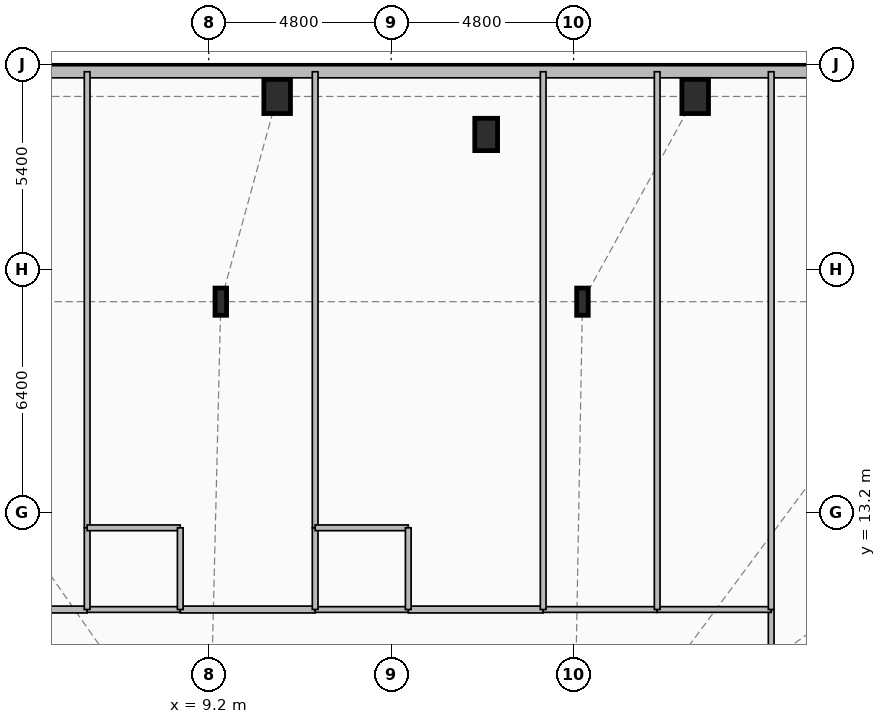
"""IFC4 building model, lengths in metres.
Left out: names, types, materials, properties, quantities, classifications, styles, units other than length and angle.
Written with IfcOpenShell. Run it as: python <this file> out.ifc"""

import sys

from ifc_helpers import new_model, si_unit, direction, frame, frame_2d, origin, origin_2d, place, context, subcontext, project, spatial, rectangle, i_section, extrude, element, fill, save


model = new_model("IFC4")
c1 = context("Model", 3, precision=1e-05, world=origin(), true_north=direction((0.0, 1.0)))
c2 = subcontext(c1, "Body", "Model", "MODEL_VIEW")
j1 = project(units=[si_unit("LENGTHUNIT", "METRE"), si_unit("PLANEANGLEUNIT", "RADIAN")], contexts=[c1])
p1 = place(None, origin())
s1 = spatial("IfcSite", under=j1, at=p1, CompositionType="ELEMENT")
p2 = place(p1, origin())
s2 = spatial("IfcBuilding", under=s1, at=p2, CompositionType="ELEMENT")
p3 = place(p2, frame((0.0, 0.0, 22.5)))
s3 = spatial("IfcBuildingStorey", under=s2, at=p3, CompositionType="ELEMENT", Elevation=22.5)
for number, where, z_axis, x_axis in (
    (1, (11.0, 24.15, 0.0), (0.0, 0.0, 1.0), (1.0, 0.0, 0.0)),
    (2, (22.0, 24.15, 0.0), (0.0, 0.0, 1.0), (1.0, 0.0, 0.0)),
):
    element("IfcColumn", number, at=place(p3, frame(where, z_axis=z_axis, x_axis=x_axis)), inside=s3, PredefinedType="COLUMN", context=c2, shape_type="SweptSolid", body=[
        extrude(rectangle(XDim=0.7, YDim=0.9, at=origin_2d()), origin(), (0.0, 0.0, 1.0), 4.5),
    ])
p4 = place(p3, frame((16.5, 23.15, 0.0), z_axis=(0.0, 0.0, 1.0), x_axis=(1.0, 0.0, 0.0)))
e3 = element("IfcColumn", 3, at=p4, inside=s3, PredefinedType="PILASTER", context=c2, shape_type="SweptSolid", body=[
    extrude(rectangle(XDim=0.6, YDim=0.85, at=origin_2d()), origin(), (0.0, 0.0, 1.0), 4.5),
])
for number, where, z_axis, x_axis in (
    (4, (19.033, 18.75, 0.0), (0.0, 0.0, 1.0), (1.0, 0.0, 0.0)),
    (5, (9.517, 18.75, 0.0), (0.0, 0.0, 1.0), (1.0, 0.0, 0.0)),
):
    element("IfcColumn", number, at=place(p3, frame(where, z_axis=z_axis, x_axis=x_axis)), inside=s3, PredefinedType="COLUMN", context=c2, shape_type="SweptSolid", body=[
        extrude(i_section(OverallWidth=0.304, OverallDepth=0.716, WebThickness=0.021, FlangeThickness=0.04, FilletRadius=0.027, at=origin_2d()), origin(), (0.0, 0.0, 1.0), 4.5),
    ])
p5 = place(p3, frame((-36.8, 24.8, 0.0), z_axis=(0.0, 0.0, 1.0), x_axis=(1.0, 0.0, 0.0)))
e6 = element("IfcWall", 6, at=p5, inside=s3, PredefinedType="SOLIDWALL", context=c2, shape_type="SweptSolid", body=[
    extrude(rectangle(XDim=73.6, YDim=0.32, at=frame_2d((36.8, 0.0))), origin(), (0.0, 0.0, 1.0), 4.16),
])
p6 = place(p5, frame((1.079, 0.0, 0.85)))
e7 = element("IfcOpeningElement", 7, at=p6, cuts=e6, PredefinedType="OPENING", context=c2, shape_type="SweptSolid", body=[
    extrude(rectangle(XDim=2.3, YDim=2.4, at=frame_2d((1.15, 1.2))), frame((0.0, 0.17, 0.0), z_axis=(0.0, -1.0, 0.0), x_axis=(1.0, 0.0, 0.0)), (0.0, 0.0, 1.0), 0.34),
])
p7 = place(p5, frame((8.431, 0.0, 0.85)))
e8 = element("IfcOpeningElement", 8, at=p7, cuts=e6, PredefinedType="OPENING", context=c2, shape_type="SweptSolid", body=[
    extrude(rectangle(XDim=2.6, YDim=2.4, at=frame_2d((1.3, 1.2))), frame((0.0, 0.17, 0.0), z_axis=(0.0, -1.0, 0.0), x_axis=(1.0, 0.0, 0.0)), (0.0, 0.0, 1.0), 0.34),
])
p8 = place(p5, frame((13.316, 0.0, 0.85)))
e9 = element("IfcOpeningElement", 9, at=p8, cuts=e6, PredefinedType="OPENING", context=c2, shape_type="SweptSolid", body=[
    extrude(rectangle(XDim=1.1, YDim=1.85, at=frame_2d((0.55, 0.925))), frame((0.0, 0.17, 0.0), z_axis=(0.0, -1.0, 0.0), x_axis=(1.0, 0.0, 0.0)), (0.0, 0.0, 1.0), 0.34),
])
p9 = place(p5, frame((16.339, 0.0, 0.85)))
e10 = element("IfcOpeningElement", 10, at=p9, cuts=e6, PredefinedType="OPENING", context=c2, shape_type="SweptSolid", body=[
    extrude(rectangle(XDim=2.0, YDim=2.4, at=frame_2d((1.0, 1.2))), frame((0.0, 0.17, 0.0), z_axis=(0.0, -1.0, 0.0), x_axis=(1.0, 0.0, 0.0)), (0.0, 0.0, 1.0), 0.34),
])
p10 = place(p5, frame((21.875, 0.0, 0.85)))
e11 = element("IfcOpeningElement", 11, at=p10, cuts=e6, PredefinedType="OPENING", context=c2, shape_type="SweptSolid", body=[
    extrude(rectangle(XDim=2.3, YDim=2.4, at=frame_2d((1.15, 1.2))), frame((0.0, 0.17, 0.0), z_axis=(0.0, -1.0, 0.0), x_axis=(1.0, 0.0, 0.0)), (0.0, 0.0, 1.0), 0.34),
])
p11 = place(p5, frame((26.53, 0.0, 0.85)))
e12 = element("IfcOpeningElement", 12, at=p11, cuts=e6, PredefinedType="OPENING", context=c2, shape_type="SweptSolid", body=[
    extrude(rectangle(XDim=2.6, YDim=2.4, at=frame_2d((1.3, 1.2))), frame((0.0, 0.17, 0.0), z_axis=(0.0, -1.0, 0.0), x_axis=(1.0, 0.0, 0.0)), (0.0, 0.0, 1.0), 0.34),
])
p12 = place(p5, frame((32.537, 0.0, 0.85)))
e13 = element("IfcOpeningElement", 13, at=p12, cuts=e6, PredefinedType="OPENING", context=c2, shape_type="SweptSolid", body=[
    extrude(rectangle(XDim=2.6, YDim=2.4, at=frame_2d((1.3, 1.2))), frame((0.0, 0.17, 0.0), z_axis=(0.0, -1.0, 0.0), x_axis=(1.0, 0.0, 0.0)), (0.0, 0.0, 1.0), 0.34),
])
p13 = place(p5, frame((38.543, 0.0, 0.85)))
e14 = element("IfcOpeningElement", 14, at=p13, cuts=e6, PredefinedType="OPENING", context=c2, shape_type="SweptSolid", body=[
    extrude(rectangle(XDim=2.6, YDim=2.4, at=frame_2d((1.3, 1.2))), frame((0.0, 0.17, 0.0), z_axis=(0.0, -1.0, 0.0), x_axis=(1.0, 0.0, 0.0)), (0.0, 0.0, 1.0), 0.34),
])
p14 = place(p5, frame((44.55, 0.0, 0.85)))
e15 = element("IfcOpeningElement", 15, at=p14, cuts=e6, PredefinedType="OPENING", context=c2, shape_type="SweptSolid", body=[
    extrude(rectangle(XDim=2.6, YDim=2.4, at=frame_2d((1.3, 1.2))), frame((0.0, 0.17, 0.0), z_axis=(0.0, -1.0, 0.0), x_axis=(1.0, 0.0, 0.0)), (0.0, 0.0, 1.0), 0.34),
])
p15 = place(p5, frame((50.556, 0.0, 0.85)))
e16 = element("IfcOpeningElement", 16, at=p15, cuts=e6, PredefinedType="OPENING", context=c2, shape_type="SweptSolid", body=[
    extrude(rectangle(XDim=2.6, YDim=2.4, at=frame_2d((1.3, 1.2))), frame((0.0, 0.17, 0.0), z_axis=(0.0, -1.0, 0.0), x_axis=(1.0, 0.0, 0.0)), (0.0, 0.0, 1.0), 0.34),
])
p16 = place(p5, frame((55.341, 0.0, 0.85)))
e17 = element("IfcOpeningElement", 17, at=p16, cuts=e6, PredefinedType="OPENING", context=c2, shape_type="SweptSolid", body=[
    extrude(rectangle(XDim=2.0, YDim=2.4, at=frame_2d((1.0, 1.2))), frame((0.0, 0.17, 0.0), z_axis=(0.0, -1.0, 0.0), x_axis=(1.0, 0.0, 0.0)), (0.0, 0.0, 1.0), 0.34),
])
p17 = place(p5, frame((59.16, 0.0, 0.85)))
e18 = element("IfcOpeningElement", 18, at=p17, cuts=e6, PredefinedType="OPENING", context=c2, shape_type="SweptSolid", body=[
    extrude(rectangle(XDim=1.1, YDim=1.85, at=frame_2d((0.55, 0.925))), frame((0.0, 0.17, 0.0), z_axis=(0.0, -1.0, 0.0), x_axis=(1.0, 0.0, 0.0)), (0.0, 0.0, 1.0), 0.34),
])
p18 = place(p5, frame((62.649, 0.0, 0.85)))
e19 = element("IfcOpeningElement", 19, at=p18, cuts=e6, PredefinedType="OPENING", context=c2, shape_type="SweptSolid", body=[
    extrude(rectangle(XDim=2.6, YDim=2.4, at=frame_2d((1.3, 1.2))), frame((0.0, 0.17, 0.0), z_axis=(0.0, -1.0, 0.0), x_axis=(1.0, 0.0, 0.0)), (0.0, 0.0, 1.0), 0.34),
])
p19 = place(p5, frame((70.301, 0.0, 0.85)))
e20 = element("IfcOpeningElement", 20, at=p19, cuts=e6, PredefinedType="OPENING", context=c2, shape_type="SweptSolid", body=[
    extrude(rectangle(XDim=2.3, YDim=2.4, at=frame_2d((1.15, 1.2))), frame((0.0, 0.17, 0.0), z_axis=(0.0, -1.0, 0.0), x_axis=(1.0, 0.0, 0.0)), (0.0, 0.0, 1.0), 0.34),
])
p20 = place(p3, frame((24.0, 10.65, 0.0), z_axis=(0.0, 0.0, 1.0), x_axis=(0.0, -1.0, 0.0)))
e21 = element("IfcWall", 21, at=p20, inside=s3, PredefinedType="PARTITIONING", context=c2, shape_type="SweptSolid", body=[
    extrude(rectangle(XDim=2.15, YDim=0.15, at=frame_2d((1.075, 0.0))), origin(), (0.0, 0.0, 1.0), 4.16),
])
p21 = place(p20, frame((0.625, 0.0, 0.0)))
e22 = element("IfcOpeningElement", 22, at=p21, cuts=e21, PredefinedType="OPENING", context=c2, shape_type="SweptSolid", body=[
    extrude(rectangle(XDim=0.9, YDim=2.1, at=frame_2d((0.45, 1.05))), frame((0.0, 0.085, 0.0), z_axis=(0.0, -1.0, 0.0), x_axis=(1.0, 0.0, 0.0)), (0.0, 0.0, 1.0), 0.17),
])
p22 = place(p3, frame((2.45, 10.65, 0.0), z_axis=(0.0, 0.0, 1.0), x_axis=(1.0, 0.0, 0.0)))
e23 = element("IfcWall", 23, at=p22, inside=s3, PredefinedType="PARTITIONING", context=c2, shape_type="SweptSolid", body=[
    extrude(rectangle(XDim=3.55, YDim=0.18, at=frame_2d((1.775, 0.0))), origin(), (0.0, 0.0, 1.0), 4.16),
])
p23 = place(p22, frame((0.754, 0.0, 0.0)))
e24 = element("IfcOpeningElement", 24, at=p23, cuts=e23, PredefinedType="OPENING", context=c2, shape_type="SweptSolid", body=[
    extrude(rectangle(XDim=1.0, YDim=2.15, at=frame_2d((0.5, 1.075))), frame((0.0, 0.1, 0.0), z_axis=(0.0, -1.0, 0.0), x_axis=(1.0, 0.0, 0.0)), (0.0, 0.0, 1.0), 0.2),
])
p24 = place(p3, frame((8.45, 10.65, 0.0), z_axis=(0.0, 0.0, 1.0), x_axis=(1.0, 0.0, 0.0)))
e25 = element("IfcWall", 25, at=p24, inside=s3, PredefinedType="PARTITIONING", context=c2, shape_type="SweptSolid", body=[
    extrude(rectangle(XDim=3.55, YDim=0.18, at=frame_2d((1.775, 0.0))), origin(), (0.0, 0.0, 1.0), 4.16),
])
p25 = place(p24, frame((1.796, 0.0, 0.0)))
e26 = element("IfcOpeningElement", 26, at=p25, cuts=e25, PredefinedType="OPENING", context=c2, shape_type="SweptSolid", body=[
    extrude(rectangle(XDim=1.0, YDim=2.15, at=frame_2d((0.5, 1.075))), frame((0.0, 0.1, 0.0), z_axis=(0.0, -1.0, 0.0), x_axis=(1.0, 0.0, 0.0)), (0.0, 0.0, 1.0), 0.2),
])
p26 = place(p3, frame((6.0, 10.65, 0.0), z_axis=(0.0, 0.0, 1.0), x_axis=(1.0, 0.0, 0.0)))
e27 = element("IfcWall", 27, at=p26, inside=s3, PredefinedType="PLUMBINGWALL", context=c2, shape_type="SweptSolid", body=[
    extrude(rectangle(XDim=2.45, YDim=0.15, at=frame_2d((1.225, 0.0))), origin(), (0.0, 0.0, 1.0), 4.16),
])
p27 = place(p3, frame((14.45, 10.65, 0.0), z_axis=(0.0, 0.0, 1.0), x_axis=(1.0, 0.0, 0.0)))
e28 = element("IfcWall", 28, at=p27, inside=s3, PredefinedType="PARTITIONING", context=c2, shape_type="SweptSolid", body=[
    extrude(rectangle(XDim=3.55, YDim=0.18, at=frame_2d((1.775, 0.0))), origin(), (0.0, 0.0, 1.0), 4.16),
])
p28 = place(p27, frame((0.754, 0.0, 0.0)))
e29 = element("IfcOpeningElement", 29, at=p28, cuts=e28, PredefinedType="OPENING", context=c2, shape_type="SweptSolid", body=[
    extrude(rectangle(XDim=1.0, YDim=2.15, at=frame_2d((0.5, 1.075))), frame((0.0, 0.1, 0.0), z_axis=(0.0, -1.0, 0.0), x_axis=(1.0, 0.0, 0.0)), (0.0, 0.0, 1.0), 0.2),
])
p29 = place(p3, frame((12.0, 10.65, 0.0), z_axis=(0.0, 0.0, 1.0), x_axis=(1.0, 0.0, 0.0)))
e30 = element("IfcWall", 30, at=p29, inside=s3, PredefinedType="PLUMBINGWALL", context=c2, shape_type="SweptSolid", body=[
    extrude(rectangle(XDim=2.45, YDim=0.15, at=frame_2d((1.225, 0.0))), origin(), (0.0, 0.0, 1.0), 4.16),
])
p30 = place(p3, frame((18.0, 10.65, 0.0), z_axis=(0.0, 0.0, 1.0), x_axis=(1.0, 0.0, 0.0)))
e31 = element("IfcWall", 31, at=p30, inside=s3, PredefinedType="PARTITIONING", context=c2, shape_type="SweptSolid", body=[
    extrude(rectangle(XDim=3.0, YDim=0.15, at=frame_2d((1.5, 0.0))), origin(), (0.0, 0.0, 1.0), 4.16),
])
p31 = place(p30, frame((1.271, 0.0, 0.0)))
e32 = element("IfcOpeningElement", 32, at=p31, cuts=e31, PredefinedType="OPENING", context=c2, shape_type="SweptSolid", body=[
    extrude(rectangle(XDim=1.05, YDim=2.15, at=frame_2d((0.525, 1.075))), frame((0.0, 0.085, 0.0), z_axis=(0.0, -1.0, 0.0), x_axis=(1.0, 0.0, 0.0)), (0.0, 0.0, 1.0), 0.17),
])
p32 = place(p3, frame((21.0, 10.65, 0.0), z_axis=(0.0, 0.0, 1.0), x_axis=(1.0, 0.0, 0.0)))
e33 = element("IfcWall", 33, at=p32, inside=s3, PredefinedType="PARTITIONING", context=c2, shape_type="SweptSolid", body=[
    extrude(rectangle(XDim=3.0, YDim=0.15, at=frame_2d((1.5, 0.0))), origin(), (0.0, 0.0, 1.0), 4.16),
])
p33 = place(p32, frame((1.271, 0.0, 0.0)))
e34 = element("IfcOpeningElement", 34, at=p33, cuts=e33, PredefinedType="OPENING", context=c2, shape_type="SweptSolid", body=[
    extrude(rectangle(XDim=1.05, YDim=2.15, at=frame_2d((0.525, 1.075))), frame((0.0, 0.085, 0.0), z_axis=(0.0, -1.0, 0.0), x_axis=(1.0, 0.0, 0.0)), (0.0, 0.0, 1.0), 0.17),
])
p34 = place(p3, frame((24.0, 10.65, 0.0), z_axis=(0.0, 0.0, 1.0), x_axis=(0.0, 1.0, 0.0)))
e35 = element("IfcWall", 35, at=p34, inside=s3, PredefinedType="PARTITIONING", context=c2, shape_type="SweptSolid", body=[
    extrude(rectangle(XDim=14.15, YDim=0.15, at=frame_2d((7.075, 0.0))), origin(), (0.0, 0.0, 1.0), 4.16),
])
p35 = place(p3, frame((6.0, 24.8, 0.0), z_axis=(0.0, 0.0, 1.0), x_axis=(0.0, -1.0, 0.0)))
e36 = element("IfcWall", 36, at=p35, inside=s3, PredefinedType="PARTITIONING", context=c2, shape_type="SweptSolid", body=[
    extrude(rectangle(XDim=12.0, YDim=0.15, at=frame_2d((6.0, 0.0))), origin(), (0.0, 0.0, 1.0), 4.16),
])
p36 = place(p3, frame((6.0, 12.8, 0.0), z_axis=(0.0, 0.0, 1.0), x_axis=(0.0, -1.0, 0.0)))
e37 = element("IfcWall", 37, at=p36, inside=s3, PredefinedType="PLUMBINGWALL", context=c2, shape_type="SweptSolid", body=[
    extrude(rectangle(XDim=2.15, YDim=0.15, at=frame_2d((1.075, 0.0))), origin(), (0.0, 0.0, 1.0), 4.16),
])
p37 = place(p3, frame((8.45, 12.8, 0.0), z_axis=(0.0, 0.0, 1.0), x_axis=(-1.0, 0.0, 0.0)))
e38 = element("IfcWall", 38, at=p37, inside=s3, PredefinedType="PLUMBINGWALL", context=c2, shape_type="SweptSolid", body=[
    extrude(rectangle(XDim=2.45, YDim=0.15, at=frame_2d((1.225, 0.0))), origin(), (0.0, 0.0, 1.0), 4.16),
])
p38 = place(p37, frame((0.921, 0.0, 0.0)))
e39 = element("IfcOpeningElement", 39, at=p38, cuts=e38, PredefinedType="OPENING", context=c2, shape_type="SweptSolid", body=[
    extrude(rectangle(XDim=0.9, YDim=2.1, at=frame_2d((0.45, 1.05))), frame((0.0, 0.085, 0.0), z_axis=(0.0, -1.0, 0.0), x_axis=(1.0, 0.0, 0.0)), (0.0, 0.0, 1.0), 0.17),
])
p39 = place(p3, frame((8.45, 10.65, 0.0), z_axis=(0.0, 0.0, 1.0), x_axis=(0.0, 1.0, 0.0)))
e40 = element("IfcWall", 40, at=p39, inside=s3, PredefinedType="PLUMBINGWALL", context=c2, shape_type="SweptSolid", body=[
    extrude(rectangle(XDim=2.15, YDim=0.15, at=frame_2d((1.075, 0.0))), origin(), (0.0, 0.0, 1.0), 4.16),
])
p40 = place(p3, frame((12.0, 24.8, 0.0), z_axis=(0.0, 0.0, 1.0), x_axis=(0.0, -1.0, 0.0)))
e41 = element("IfcWall", 41, at=p40, inside=s3, PredefinedType="PARTITIONING", context=c2, shape_type="SweptSolid", body=[
    extrude(rectangle(XDim=12.0, YDim=0.15, at=frame_2d((6.0, 0.0))), origin(), (0.0, 0.0, 1.0), 4.16),
])
p41 = place(p3, frame((12.0, 12.8, 0.0), z_axis=(0.0, 0.0, 1.0), x_axis=(0.0, -1.0, 0.0)))
e42 = element("IfcWall", 42, at=p41, inside=s3, PredefinedType="PLUMBINGWALL", context=c2, shape_type="SweptSolid", body=[
    extrude(rectangle(XDim=2.15, YDim=0.15, at=frame_2d((1.075, 0.0))), origin(), (0.0, 0.0, 1.0), 4.16),
])
p42 = place(p3, frame((14.45, 12.8, 0.0), z_axis=(0.0, 0.0, 1.0), x_axis=(-1.0, 0.0, 0.0)))
e43 = element("IfcWall", 43, at=p42, inside=s3, PredefinedType="PLUMBINGWALL", context=c2, shape_type="SweptSolid", body=[
    extrude(rectangle(XDim=2.45, YDim=0.15, at=frame_2d((1.225, 0.0))), origin(), (0.0, 0.0, 1.0), 4.16),
])
p43 = place(p42, frame((0.629, 0.0, 0.0)))
e44 = element("IfcOpeningElement", 44, at=p43, cuts=e43, PredefinedType="OPENING", context=c2, shape_type="SweptSolid", body=[
    extrude(rectangle(XDim=0.9, YDim=2.1, at=frame_2d((0.45, 1.05))), frame((0.0, 0.085, 0.0), z_axis=(0.0, -1.0, 0.0), x_axis=(1.0, 0.0, 0.0)), (0.0, 0.0, 1.0), 0.17),
])
p44 = place(p3, frame((14.45, 10.65, 0.0), z_axis=(0.0, 0.0, 1.0), x_axis=(0.0, 1.0, 0.0)))
e45 = element("IfcWall", 45, at=p44, inside=s3, PredefinedType="PLUMBINGWALL", context=c2, shape_type="SweptSolid", body=[
    extrude(rectangle(XDim=2.15, YDim=0.15, at=frame_2d((1.075, 0.0))), origin(), (0.0, 0.0, 1.0), 4.16),
])
for number, where, z_axis, x_axis in (
    (46, (18.0, 24.8, 0.0), (0.0, 0.0, 1.0), (0.0, -1.0, 0.0)),
    (47, (21.0, 24.8, 0.0), (0.0, 0.0, 1.0), (0.0, -1.0, 0.0)),
):
    element("IfcWall", number, at=place(p3, frame(where, z_axis=z_axis, x_axis=x_axis)), inside=s3, PredefinedType="PARTITIONING", context=c2, shape_type="SweptSolid", body=[
        extrude(rectangle(XDim=14.15, YDim=0.15, at=frame_2d((7.075, 0.0))), origin(), (0.0, 0.0, 1.0), 4.16),
    ])
p45 = place(p14, origin())
e48 = element("IfcWindow", 48, at=p45, inside=s3, PartitioningType="SINGLE_PANEL", PredefinedType="WINDOW", context=c2, shape_type="SweptSolid", body=[
    extrude(rectangle(XDim=2.6, YDim=2.4, at=frame_2d((1.3, 1.2))), frame((0.0, 0.03, 0.0), z_axis=(0.0, -1.0, 0.0), x_axis=(1.0, 0.0, 0.0)), (0.0, 0.0, 1.0), 0.06),
])
fill(e15, e48)
p46 = place(p15, origin())
e49 = element("IfcWindow", 49, at=p46, inside=s3, PartitioningType="SINGLE_PANEL", PredefinedType="WINDOW", context=c2, shape_type="SweptSolid", body=[
    extrude(rectangle(XDim=2.6, YDim=2.4, at=frame_2d((1.3, 1.2))), frame((0.0, 0.03, 0.0), z_axis=(0.0, -1.0, 0.0), x_axis=(1.0, 0.0, 0.0)), (0.0, 0.0, 1.0), 0.06),
])
fill(e16, e49)
p47 = place(p16, origin())
e50 = element("IfcWindow", 50, at=p47, inside=s3, PartitioningType="SINGLE_PANEL", PredefinedType="WINDOW", context=c2, shape_type="SweptSolid", body=[
    extrude(rectangle(XDim=2.0, YDim=2.4, at=frame_2d((1.0, 1.2))), frame((0.0, 0.03, 0.0), z_axis=(0.0, -1.0, 0.0), x_axis=(1.0, 0.0, 0.0)), (0.0, 0.0, 1.0), 0.06),
])
fill(e17, e50)
p48 = place(p17, origin())
e51 = element("IfcWindow", 51, at=p48, inside=s3, PartitioningType="SINGLE_PANEL", PredefinedType="WINDOW", context=c2, shape_type="SweptSolid", body=[
    extrude(rectangle(XDim=1.1, YDim=1.85, at=frame_2d((0.55, 0.925))), frame((0.0, 0.03, 0.0), z_axis=(0.0, -1.0, 0.0), x_axis=(1.0, 0.0, 0.0)), (0.0, 0.0, 1.0), 0.06),
])
fill(e18, e51)
p49 = place(p21, origin())
e52 = element("IfcDoor", 52, at=p49, inside=s3, OperationType="SINGLE_SWING_LEFT", PredefinedType="DOOR", context=c2, shape_type="SweptSolid", body=[
    extrude(rectangle(XDim=0.9, YDim=2.1, at=frame_2d((0.45, 1.05))), frame((0.0, 0.025, 0.0), z_axis=(0.0, -1.0, 0.0), x_axis=(1.0, 0.0, 0.0)), (0.0, 0.0, 1.0), 0.05),
])
fill(e22, e52)
p50 = place(p25, origin())
e53 = element("IfcDoor", 53, at=p50, inside=s3, OperationType="SINGLE_SWING_RIGHT", PredefinedType="DOOR", context=c2, shape_type="SweptSolid", body=[
    extrude(rectangle(XDim=1.0, YDim=2.15, at=frame_2d((0.5, 1.075))), frame((0.0, 0.025, 0.0), z_axis=(0.0, -1.0, 0.0), x_axis=(1.0, 0.0, 0.0)), (0.0, 0.0, 1.0), 0.05),
])
fill(e26, e53)
p51 = place(p28, origin())
e54 = element("IfcDoor", 54, at=p51, inside=s3, OperationType="SINGLE_SWING_LEFT", PredefinedType="DOOR", context=c2, shape_type="SweptSolid", body=[
    extrude(rectangle(XDim=1.0, YDim=2.15, at=frame_2d((0.5, 1.075))), frame((0.0, 0.025, 0.0), z_axis=(0.0, -1.0, 0.0), x_axis=(1.0, 0.0, 0.0)), (0.0, 0.0, 1.0), 0.05),
])
fill(e29, e54)
p52 = place(p31, origin())
e55 = element("IfcDoor", 55, at=p52, inside=s3, OperationType="SINGLE_SWING_RIGHT", PredefinedType="DOOR", context=c2, shape_type="SweptSolid", body=[
    extrude(rectangle(XDim=1.05, YDim=2.15, at=frame_2d((0.525, 1.075))), frame((0.0, 0.025, 0.0), z_axis=(0.0, -1.0, 0.0), x_axis=(1.0, 0.0, 0.0)), (0.0, 0.0, 1.0), 0.05),
])
fill(e32, e55)
p53 = place(p33, origin())
e56 = element("IfcDoor", 56, at=p53, inside=s3, OperationType="SINGLE_SWING_LEFT", PredefinedType="DOOR", context=c2, shape_type="SweptSolid", body=[
    extrude(rectangle(XDim=1.05, YDim=2.15, at=frame_2d((0.525, 1.075))), frame((0.0, 0.025, 0.0), z_axis=(0.0, -1.0, 0.0), x_axis=(1.0, 0.0, 0.0)), (0.0, 0.0, 1.0), 0.05),
])
fill(e34, e56)
p54 = place(p38, origin())
e57 = element("IfcDoor", 57, at=p54, inside=s3, OperationType="SINGLE_SWING_LEFT", PredefinedType="DOOR", context=c2, shape_type="SweptSolid", body=[
    extrude(rectangle(XDim=0.9, YDim=2.1, at=frame_2d((0.45, 1.05))), frame((0.0, 0.025, 0.0), z_axis=(0.0, -1.0, 0.0), x_axis=(1.0, 0.0, 0.0)), (0.0, 0.0, 1.0), 0.05),
])
fill(e39, e57)
p55 = place(p43, origin())
e58 = element("IfcDoor", 58, at=p55, inside=s3, OperationType="SINGLE_SWING_RIGHT", PredefinedType="DOOR", context=c2, shape_type="SweptSolid", body=[
    extrude(rectangle(XDim=0.9, YDim=2.1, at=frame_2d((0.45, 1.05))), frame((0.0, 0.025, 0.0), z_axis=(0.0, -1.0, 0.0), x_axis=(1.0, 0.0, 0.0)), (0.0, 0.0, 1.0), 0.05),
])
fill(e44, e58)
save(model, sys.argv[1])
